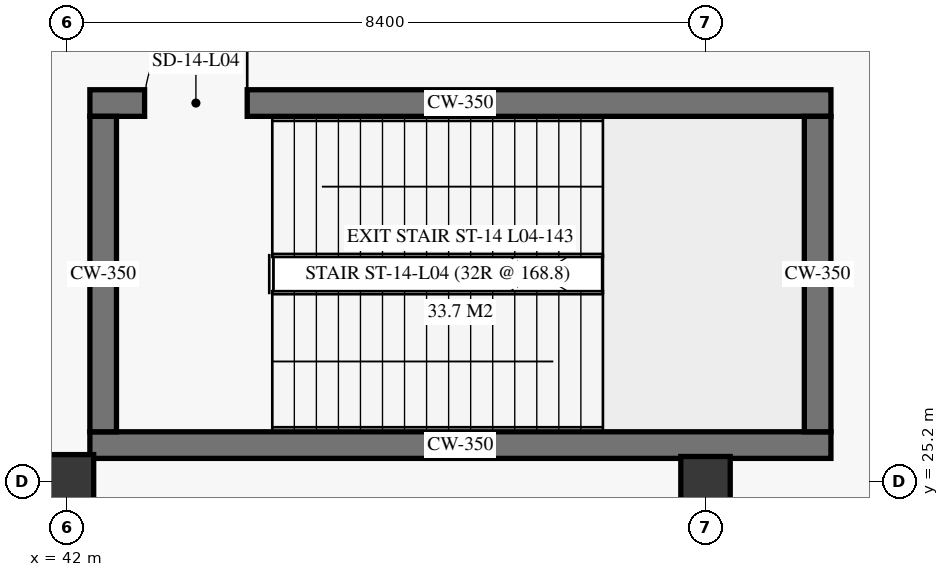
"""IFC4 building model, lengths in metres.
Left out: names, types, materials, properties, quantities, classifications, styles, units other than length and angle.
Written with IfcOpenShell. Run it as: python <this file> out.ifc"""

import sys

from ifc_helpers import new_model, si_unit, direction, frame, frame_2d, origin, origin_2d, place, context, subcontext, project, spatial, rectangle, extrude, element, fill, save


model = new_model("IFC4")
c1 = context("Model", 3, precision=1e-05, world=origin(), true_north=direction((0.0, 1.0)))
c2 = subcontext(c1, "Body", "Model", "MODEL_VIEW")
j1 = project(units=[si_unit("LENGTHUNIT", "METRE"), si_unit("PLANEANGLEUNIT", "RADIAN")], contexts=[c1])
p1 = place(None, origin())
s1 = spatial("IfcSite", under=j1, at=p1, CompositionType="ELEMENT")
p2 = place(p1, origin())
s2 = spatial("IfcBuilding", under=s1, at=p2, CompositionType="ELEMENT")
p3 = place(p2, frame((0.0, 0.0, 16.8)))
s3 = spatial("IfcBuildingStorey", under=s2, at=p3, CompositionType="ELEMENT", Elevation=16.8)
p4 = place(p3, frame((42.0, 25.2, 0.0), z_axis=(0.0, 0.0, 1.0), x_axis=(1.0, 0.0, 0.0)))
e1 = element("IfcColumn", 1, at=p4, inside=s3, PredefinedType="COLUMN", context=c2, shape_type="SweptSolid", body=[
    extrude(rectangle(XDim=0.7, YDim=0.7, at=origin_2d()), origin(), (0.0, 0.0, 1.0), 5.1),
])
p5 = place(p3, frame((50.4, 25.2, 0.0), z_axis=(0.0, 0.0, 1.0), x_axis=(1.0, 0.0, 0.0)))
e2 = element("IfcColumn", 2, at=p5, inside=s3, PredefinedType="COLUMN", context=c2, shape_type="SweptSolid", body=[
    extrude(rectangle(XDim=0.65, YDim=0.65, at=origin_2d()), origin(), (0.0, 0.0, 1.0), 5.1),
])
p6 = place(p3, frame((42.3, 25.675, 0.0), z_axis=(0.0, 0.0, 1.0), x_axis=(1.0, 0.0, 0.0)))
e3 = element("IfcWall", 3, at=p6, inside=s3, PredefinedType="SHEAR", context=c2, shape_type="SweptSolid", body=[
    extrude(rectangle(XDim=9.75, YDim=0.35, at=frame_2d((4.875, 0.0))), origin(), (0.0, 0.0, 1.0), 5.1),
])
p7 = place(p3, frame((42.3, 30.175, 0.0), z_axis=(0.0, 0.0, 1.0), x_axis=(1.0, 0.0, 0.0)))
e4 = element("IfcWall", 4, at=p7, inside=s3, PredefinedType="SHEAR", context=c2, shape_type="SweptSolid", body=[
    extrude(rectangle(XDim=9.75, YDim=0.35, at=frame_2d((4.875, 0.0))), origin(), (0.0, 0.0, 1.0), 5.1),
])
p8 = place(p7, frame((0.72, 0.0, 0.0)))
e5 = element("IfcOpeningElement", 5, at=p8, cuts=e4, PredefinedType="OPENING", context=c2, shape_type="SweptSolid", body=[
    extrude(rectangle(XDim=1.35, YDim=2.25, at=frame_2d((0.675, 1.125))), frame((0.0, 0.185, 0.0), z_axis=(0.0, -1.0, 0.0), x_axis=(1.0, 0.0, 0.0)), (0.0, 0.0, 1.0), 0.37),
])
for number, where, z_axis, x_axis in (
    (6, (42.475, 25.85, 0.0), (0.0, 0.0, 1.0), (0.0, 1.0, 0.0)),
    (7, (51.875, 25.85, 0.0), (0.0, 0.0, 1.0), (0.0, 1.0, 0.0)),
):
    element("IfcWall", number, at=place(p3, frame(where, z_axis=z_axis, x_axis=x_axis)), inside=s3, PredefinedType="SHEAR", context=c2, shape_type="SweptSolid", body=[
        extrude(rectangle(XDim=4.15, YDim=0.35, at=frame_2d((2.075, 0.0))), origin(), (0.0, 0.0, 1.0), 5.1),
    ])
p9 = place(p8, origin())
e8 = element("IfcDoor", 8, at=p9, inside=s3, OperationType="SINGLE_SWING_RIGHT", PredefinedType="DOOR", context=c2, shape_type="SweptSolid", body=[
    extrude(rectangle(XDim=1.35, YDim=2.25, at=frame_2d((0.675, 1.125))), frame((0.0, 0.025, 0.0), z_axis=(0.0, -1.0, 0.0), x_axis=(1.0, 0.0, 0.0)), (0.0, 0.0, 1.0), 0.05),
])
fill(e5, e8)
save(model, sys.argv[1])
